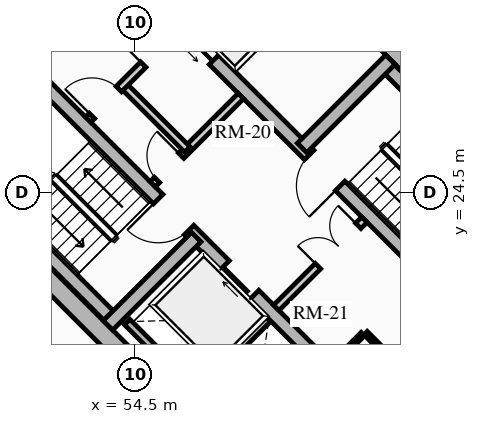
"""IFC4 building model, lengths in metres.
Left out: names, types, materials, properties, quantities, classifications, styles, units other than length and angle.
Written with IfcOpenShell. Run it as: python <this file> out.ifc"""

import sys

from ifc_helpers import new_model, si_unit, direction, frame, frame_2d, origin, place, context, subcontext, project, spatial, rectangle, extrude, source, transform, mapped, element, fill, save


model = new_model("IFC4")
c1 = context("Model", 3, precision=1e-05, world=origin(), true_north=direction((0.0, 1.0)))
c2 = subcontext(c1, "Body", "Model", "MODEL_VIEW")
j1 = project(units=[si_unit("LENGTHUNIT", "METRE"), si_unit("PLANEANGLEUNIT", "RADIAN")], contexts=[c1])
p1 = place(None, origin())
s1 = spatial("IfcSite", under=j1, at=p1, CompositionType="ELEMENT")
p2 = place(p1, origin())
s2 = spatial("IfcBuilding", under=s1, at=p2, CompositionType="ELEMENT")
p3 = place(p2, frame((0.0, 0.0, 59.83)))
s3 = spatial("IfcBuildingStorey", under=s2, at=p3, CompositionType="ELEMENT", Elevation=59.83)
for number, where, z_axis, x_axis in (
    (1, (58.773, 15.661, 0.0), (0.0, 0.0, 1.0), (-0.707, 0.707, 0.0)),
    (2, (66.339, 23.227, 0.0), (0.0, 0.0, 1.0), (-0.707, 0.707, 0.0)),
):
    element("IfcWall", number, at=place(p3, frame(where, z_axis=z_axis, x_axis=x_axis)), inside=s3, PredefinedType="SHEAR", context=c2, shape_type="SweptSolid", body=[
        extrude(rectangle(XDim=14.3, YDim=0.5, at=frame_2d((7.15, 0.0))), origin(), (0.0, 0.0, 1.0), 2.91),
    ])
p4 = place(p3, frame((58.596, 15.838, 0.0), z_axis=(0.0, 0.0, 1.0), x_axis=(0.707106781187, 0.707106781187, 0.0)))
e3 = element("IfcWall", 3, at=p4, inside=s3, PredefinedType="SHEAR", context=c2, shape_type="SweptSolid", body=[
    extrude(rectangle(XDim=10.7, YDim=0.5, at=frame_2d((5.35, 0.0))), origin(), (0.0, 0.0, 1.0), 2.91),
])
m1 = source(origin(), c2, "Body", "SweptSolid", [
    extrude(rectangle(XDim=1.5, YDim=2.02, at=frame_2d((0.75, 1.01))), frame((0.0, 0.26, 0.0), z_axis=(0.0, -1.0, 0.0), x_axis=(1.0, 0.0, 0.0)), (0.0, 0.0, 1.0), 0.52),
])
p5 = place(p4, frame((5.45, 0.0, 0.0)))
e4 = element("IfcOpeningElement", 4, at=p5, cuts=e3, PredefinedType="OPENING", context=c2, shape_type="MappedRepresentation", body=[
    mapped(m1, transform((0.0, 0.0, 0.0), x_axis=(1.0, 0.0, 0.0), y_axis=(0.0, 1.0, 0.0), z_axis=(0.0, 0.0, 1.0), scale=1.0)),
])
p6 = place(p3, frame((48.838, 25.596, 0.0), z_axis=(0.0, 0.0, 1.0), x_axis=(0.707106781187, 0.707106781187, 0.0)))
e5 = element("IfcWall", 5, at=p6, inside=s3, PredefinedType="SHEAR", context=c2, shape_type="SweptSolid", body=[
    extrude(rectangle(XDim=10.7, YDim=0.5, at=frame_2d((5.35, 0.0))), origin(), (0.0, 0.0, 1.0), 2.91),
])
p7 = place(p6, frame((4.6, 0.0, 0.0)))
e6 = element("IfcOpeningElement", 6, at=p7, cuts=e5, PredefinedType="OPENING", context=c2, shape_type="MappedRepresentation", body=[
    mapped(m1, transform((0.0, 0.0, 0.0), x_axis=(1.0, 0.0, 0.0), y_axis=(0.0, 1.0, 0.0), z_axis=(0.0, 0.0, 1.0), scale=1.0)),
])
p8 = place(p3, frame((61.096, 18.338, 0.0), z_axis=(0.0, 0.0, 1.0), x_axis=(-0.707106781187, 0.707106781187, 0.0)))
e7 = element("IfcWall", 7, at=p8, inside=s3, PredefinedType="SHEAR", context=c2, shape_type="SweptSolid", body=[
    extrude(rectangle(XDim=13.8, YDim=0.35, at=frame_2d((6.9, 0.0))), origin(), (0.0, 0.0, 1.0), 2.91),
])
m2 = source(origin(), c2, "Body", "SweptSolid", [
    extrude(rectangle(XDim=1.1, YDim=2.015, at=frame_2d((0.55, 1.007))), frame((0.0, 0.185, 0.0), z_axis=(0.0, -1.0, 0.0), x_axis=(1.0, 0.0, 0.0)), (0.0, 0.0, 1.0), 0.37),
])
p9 = place(p8, frame((4.9, 0.0, 0.0)))
e8 = element("IfcOpeningElement", 8, at=p9, cuts=e7, PredefinedType="OPENING", context=c2, shape_type="MappedRepresentation", body=[
    mapped(m2, transform((0.0, 0.0, 0.0), x_axis=(1.0, 0.0, 0.0), y_axis=(0.0, 1.0, 0.0), z_axis=(0.0, 0.0, 1.0), scale=1.0)),
])
m3 = source(origin(), c2, "Body", "SweptSolid", [
    extrude(rectangle(XDim=1.15, YDim=2.02, at=frame_2d((0.575, 1.01))), frame((0.0, 0.185, 0.0), z_axis=(0.0, -1.0, 0.0), x_axis=(1.0, 0.0, 0.0)), (0.0, 0.0, 1.0), 0.37),
])
p10 = place(p8, frame((7.32, 0.0, 0.0)))
e9 = element("IfcOpeningElement", 9, at=p10, cuts=e7, PredefinedType="OPENING", context=c2, shape_type="MappedRepresentation", body=[
    mapped(m3, transform((0.0, 0.0, 0.0), x_axis=(1.0, 0.0, 0.0), y_axis=(0.0, 1.0, 0.0), z_axis=(0.0, 0.0, 1.0), scale=1.0)),
])
p11 = place(p3, frame((63.662, 20.904, 0.0), z_axis=(0.0, 0.0, 1.0), x_axis=(-0.707106781187, 0.707106781187, 0.0)))
e10 = element("IfcWall", 10, at=p11, inside=s3, PredefinedType="SHEAR", context=c2, shape_type="SweptSolid", body=[
    extrude(rectangle(XDim=13.8, YDim=0.35, at=frame_2d((6.9, 0.0))), origin(), (0.0, 0.0, 1.0), 2.91),
])
p12 = place(p11, frame((10.025, 0.0, 0.0)))
e11 = element("IfcOpeningElement", 11, at=p12, cuts=e10, PredefinedType="OPENING", context=c2, shape_type="MappedRepresentation", body=[
    mapped(m2, transform((0.0, 0.0, 0.0), x_axis=(1.0, 0.0, 0.0), y_axis=(0.0, 1.0, 0.0), z_axis=(0.0, 0.0, 1.0), scale=1.0)),
])
p13 = place(p11, frame((12.025, 0.0, 0.0)))
e12 = element("IfcOpeningElement", 12, at=p13, cuts=e10, PredefinedType="OPENING", context=c2, shape_type="MappedRepresentation", body=[
    mapped(m2, transform((0.0, 0.0, 0.0), x_axis=(1.0, 0.0, 0.0), y_axis=(0.0, 1.0, 0.0), z_axis=(0.0, 0.0, 1.0), scale=1.0)),
])
p14 = place(p11, frame((5.33, 0.0, 0.0)))
e13 = element("IfcOpeningElement", 13, at=p14, cuts=e10, PredefinedType="OPENING", context=c2, shape_type="MappedRepresentation", body=[
    mapped(m3, transform((0.0, 0.0, 0.0), x_axis=(1.0, 0.0, 0.0), y_axis=(0.0, 1.0, 0.0), z_axis=(0.0, 0.0, 1.0), scale=1.0)),
])
p15 = place(p3, frame((53.922, 21.141, 0.0), z_axis=(0.0, 0.0, 1.0), x_axis=(-0.707106781187, 0.707106781187, 0.0)))
e14 = element("IfcWall", 14, at=p15, inside=s3, PredefinedType="SHEAR", context=c2, shape_type="SweptSolid", body=[
    extrude(rectangle(XDim=6.745, YDim=0.35, at=frame_2d((3.373, 0.0))), origin(), (0.0, 0.0, 1.0), 2.91),
])
p16 = place(p3, frame((53.784, 21.003, 0.0), z_axis=(0.0, 0.0, 1.0), x_axis=(0.707106781187, 0.707106781187, 0.0)))
e15 = element("IfcWall", 15, at=p16, inside=s3, PredefinedType="SHEAR", context=c2, shape_type="SweptSolid", body=[
    extrude(rectangle(XDim=3.285, YDim=0.35, at=frame_2d((1.643, 0.0))), origin(), (0.0, 0.0, 1.0), 2.91),
])
p17 = place(p3, frame((65.847, 23.089, 0.0), z_axis=(0.0, 0.0, 1.0), x_axis=(-0.707106781187, 0.707106781187, 0.0)))
e16 = element("IfcWall", 16, at=p17, inside=s3, PredefinedType="SHEAR", context=c2, shape_type="SweptSolid", body=[
    extrude(rectangle(XDim=6.745, YDim=0.35, at=frame_2d((3.373, 0.0))), origin(), (0.0, 0.0, 1.0), 2.91),
])
p18 = place(p3, frame((58.893, 25.674, 0.0), z_axis=(0.0, 0.0, 1.0), x_axis=(0.707106781187, 0.707106781187, 0.0)))
e17 = element("IfcWall", 17, at=p18, inside=s3, PredefinedType="SHEAR", context=c2, shape_type="SweptSolid", body=[
    extrude(rectangle(XDim=3.285, YDim=0.35, at=frame_2d((1.643, 0.0))), origin(), (0.0, 0.0, 1.0), 2.91),
])
p19 = place(p3, frame((55.888, 19.069, 0.0), z_axis=(0.0, 0.0, 1.0), x_axis=(0.707106781187, 0.707106781187, 0.0)))
e18 = element("IfcWall", 18, at=p19, inside=s3, PredefinedType="SHEAR", context=c2, shape_type="SweptSolid", body=[
    extrude(rectangle(XDim=2.97, YDim=0.2, at=frame_2d((1.485, 0.0))), origin(), (0.0, 0.0, 1.0), 2.91),
])
p20 = place(p3, frame((56.015, 19.366, 0.0), z_axis=(0.0, 0.0, 1.0), x_axis=(-0.707106781187, 0.707106781187, 0.0)))
e19 = element("IfcWall", 19, at=p20, inside=s3, PredefinedType="SHEAR", context=c2, shape_type="SweptSolid", body=[
    extrude(rectangle(XDim=2.44, YDim=0.2, at=frame_2d((1.22, 0.0))), origin(), (0.0, 0.0, 1.0), 2.91),
])
p21 = place(p3, frame((57.062, 27.781, 0.0), z_axis=(0.0, 0.0, 1.0), x_axis=(0.707106781187, 0.707106781187, 0.0)))
e20 = element("IfcWall", 20, at=p21, inside=s3, PredefinedType="SHEAR", context=c2, shape_type="SweptSolid", body=[
    extrude(rectangle(XDim=2.97, YDim=0.2, at=frame_2d((1.485, 0.0))), origin(), (0.0, 0.0, 1.0), 2.91),
])
p22 = place(p3, frame((58.214, 21.467, 0.0), z_axis=(0.0, 0.0, 1.0), x_axis=(0.707106781187, 0.707106781187, 0.0)))
e21 = element("IfcWall", 21, at=p22, inside=s3, PredefinedType="PARTITIONING", context=c2, shape_type="SweptSolid", body=[
    extrude(rectangle(XDim=3.28, YDim=0.2, at=frame_2d((1.64, 0.0))), origin(), (0.0, 0.0, 1.0), 2.635),
])
m4 = source(origin(), c2, "Body", "SweptSolid", [
    extrude(rectangle(XDim=1.5, YDim=2.02, at=frame_2d((0.75, 1.01))), frame((0.0, 0.11, 0.0), z_axis=(0.0, -1.0, 0.0), x_axis=(1.0, 0.0, 0.0)), (0.0, 0.0, 1.0), 0.22),
])
p23 = place(p22, frame((1.55, 0.0, 0.0)))
e22 = element("IfcOpeningElement", 22, at=p23, cuts=e21, PredefinedType="OPENING", context=c2, shape_type="MappedRepresentation", body=[
    mapped(m4, transform((0.0, 0.0, 0.0), x_axis=(1.0, 0.0, 0.0), y_axis=(0.0, 1.0, 0.0), z_axis=(0.0, 0.0, 1.0), scale=1.0)),
])
p24 = place(p3, frame((54.961, 24.719, 0.0), z_axis=(0.0, 0.0, 1.0), x_axis=(0.707106781187, 0.707106781187, 0.0)))
e23 = element("IfcWall", 23, at=p24, inside=s3, PredefinedType="PARTITIONING", context=c2, shape_type="SweptSolid", body=[
    extrude(rectangle(XDim=3.28, YDim=0.2, at=frame_2d((1.64, 0.0))), origin(), (0.0, 0.0, 1.0), 2.635),
])
m5 = source(origin(), c2, "Body", "SweptSolid", [
    extrude(rectangle(XDim=0.9, YDim=2.005, at=frame_2d((0.45, 1.002))), frame((0.0, 0.11, 0.0), z_axis=(0.0, -1.0, 0.0), x_axis=(1.0, 0.0, 0.0)), (0.0, 0.0, 1.0), 0.22),
])
p25 = place(p24, frame((0.16, 0.0, 0.0)))
e24 = element("IfcOpeningElement", 24, at=p25, cuts=e23, PredefinedType="OPENING", context=c2, shape_type="MappedRepresentation", body=[
    mapped(m5, transform((0.0, 0.0, 0.0), x_axis=(1.0, 0.0, 0.0), y_axis=(0.0, 1.0, 0.0), z_axis=(0.0, 0.0, 1.0), scale=1.0)),
])
p26 = place(p3, frame((55.874, 25.631, 0.0), z_axis=(0.0, 0.0, 1.0), x_axis=(-0.707157639372, 0.707055919343, 0.0)))
e25 = element("IfcWall", 25, at=p26, inside=s3, PredefinedType="PARTITIONING", context=c2, shape_type="SweptSolid", body=[
    extrude(rectangle(XDim=2.4, YDim=0.2, at=frame_2d((1.2, 0.0))), origin(), (0.0, 0.0, 1.0), 2.635),
])
p27 = place(p3, frame((53.264, 26.416, 0.0), z_axis=(0.0, 0.0, 1.0), x_axis=(0.707106781187, 0.707106781187, 0.0)))
e26 = element("IfcWall", 26, at=p27, inside=s3, PredefinedType="PARTITIONING", context=c2, shape_type="SweptSolid", body=[
    extrude(rectangle(XDim=3.28, YDim=0.2, at=frame_2d((1.64, 0.0))), origin(), (0.0, 0.0, 1.0), 2.635),
])
m6 = source(origin(), c2, "Body", "SweptSolid", [
    extrude(rectangle(XDim=1.0, YDim=2.015, at=frame_2d((0.5, 1.007))), frame((0.0, 0.11, 0.0), z_axis=(0.0, -1.0, 0.0), x_axis=(1.0, 0.0, 0.0)), (0.0, 0.0, 1.0), 0.22),
])
p28 = place(p27, frame((0.14, 0.0, 0.0)))
e27 = element("IfcOpeningElement", 27, at=p28, cuts=e26, PredefinedType="OPENING", context=c2, shape_type="MappedRepresentation", body=[
    mapped(m6, transform((0.0, 0.0, 0.0), x_axis=(1.0, 0.0, 0.0), y_axis=(0.0, 1.0, 0.0), z_axis=(0.0, 0.0, 1.0), scale=1.0)),
])
p29 = place(p27, frame((2.05, 0.0, 0.0)))
e28 = element("IfcOpeningElement", 28, at=p29, cuts=e26, PredefinedType="OPENING", context=c2, shape_type="MappedRepresentation", body=[
    mapped(m5, transform((0.0, 0.0, 0.0), x_axis=(1.0, 0.0, 0.0), y_axis=(0.0, 1.0, 0.0), z_axis=(0.0, 0.0, 1.0), scale=1.0)),
])
p30 = place(p3, frame((61.835, 19.529, 0.0), z_axis=(0.0, 0.0, 1.0), x_axis=(-0.707174592913, 0.707038962956, 0.0)))
e29 = element("IfcWall", 29, at=p30, inside=s3, PredefinedType="PARTITIONING", context=c2, shape_type="SweptSolid", body=[
    extrude(rectangle(XDim=1.8, YDim=0.125, at=frame_2d((0.9, 0.0))), origin(), (0.0, 0.0, 1.0), 2.635),
])
m7 = source(origin(), c2, "Body", "SweptSolid", [
    extrude(rectangle(XDim=0.9, YDim=2.005, at=frame_2d((0.45, 1.002))), frame((0.0, 0.073, 0.0), z_axis=(0.0, -1.0, 0.0), x_axis=(1.0, 0.0, 0.0)), (0.0, 0.0, 1.0), 0.145),
])
p31 = place(p30, frame((0.42, 0.0, 0.0)))
e30 = element("IfcOpeningElement", 30, at=p31, cuts=e29, PredefinedType="OPENING", context=c2, shape_type="MappedRepresentation", body=[
    mapped(m7, transform((0.0, 0.0, 0.0), x_axis=(1.0, 0.0, 0.0), y_axis=(0.0, 1.0, 0.0), z_axis=(0.0, 0.0, 1.0), scale=1.0)),
])
p32 = place(p3, frame((59.713, 19.996, 0.0), z_axis=(0.0, 0.0, 1.0), x_axis=(0.707217726, 0.706995818963, 0.0)))
e31 = element("IfcWall", 31, at=p32, inside=s3, PredefinedType="PARTITIONING", context=c2, shape_type="SweptSolid", body=[
    extrude(rectangle(XDim=1.1, YDim=0.125, at=frame_2d((0.55, 0.0))), origin(), (0.0, 0.0, 1.0), 2.635),
])
m8 = source(origin(), c2, "Body", "SweptSolid", [
    extrude(rectangle(XDim=1.1, YDim=2.015, at=frame_2d((0.55, 1.007))), frame((0.0, 0.025, 0.0), z_axis=(0.0, -1.0, 0.0), x_axis=(1.0, 0.0, 0.0)), (0.0, 0.0, 1.0), 0.05),
])
p33 = place(p9, origin())
e32 = element("IfcDoor", 32, at=p33, inside=s3, OperationType="SLIDING_TO_RIGHT", PredefinedType="DOOR", context=c2, shape_type="MappedRepresentation", body=[
    mapped(m8, transform((0.0, 0.0, 0.0), x_axis=(1.0, 0.0, 0.0), y_axis=(0.0, 1.0, 0.0), z_axis=(0.0, 0.0, 1.0), scale=1.0)),
])
fill(e8, e32)
p34 = place(p12, origin())
e33 = element("IfcDoor", 33, at=p34, inside=s3, OperationType="SLIDING_TO_LEFT", PredefinedType="DOOR", context=c2, shape_type="MappedRepresentation", body=[
    mapped(m8, transform((0.0, 0.0, 0.0), x_axis=(1.0, 0.0, 0.0), y_axis=(0.0, 1.0, 0.0), z_axis=(0.0, 0.0, 1.0), scale=1.0)),
])
fill(e11, e33)
m9 = source(origin(), c2, "Body", "SweptSolid", [
    extrude(rectangle(XDim=1.15, YDim=2.02, at=frame_2d((0.575, 1.01))), frame((0.0, 0.025, 0.0), z_axis=(0.0, -1.0, 0.0), x_axis=(1.0, 0.0, 0.0)), (0.0, 0.0, 1.0), 0.05),
])
p35 = place(p10, origin())
e34 = element("IfcDoor", 34, at=p35, inside=s3, OperationType="SINGLE_SWING_RIGHT", PredefinedType="DOOR", context=c2, shape_type="MappedRepresentation", body=[
    mapped(m9, transform((0.0, 0.0, 0.0), x_axis=(1.0, 0.0, 0.0), y_axis=(0.0, 1.0, 0.0), z_axis=(0.0, 0.0, 1.0), scale=1.0)),
])
fill(e9, e34)
p36 = place(p14, origin())
e35 = element("IfcDoor", 35, at=p36, inside=s3, OperationType="SINGLE_SWING_LEFT", PredefinedType="DOOR", context=c2, shape_type="MappedRepresentation", body=[
    mapped(m9, transform((0.0, 0.0, 0.0), x_axis=(1.0, 0.0, 0.0), y_axis=(0.0, 1.0, 0.0), z_axis=(0.0, 0.0, 1.0), scale=1.0)),
])
fill(e13, e35)
m10 = source(origin(), c2, "Body", "SweptSolid", [
    extrude(rectangle(XDim=1.5, YDim=2.02, at=frame_2d((0.75, 1.01))), frame((0.0, 0.025, 0.0), z_axis=(0.0, -1.0, 0.0), x_axis=(1.0, 0.0, 0.0)), (0.0, 0.0, 1.0), 0.05),
])
p37 = place(p23, origin())
e36 = element("IfcDoor", 36, at=p37, inside=s3, OperationType="DOUBLE_DOOR_SINGLE_SWING", PredefinedType="DOOR", context=c2, shape_type="MappedRepresentation", body=[
    mapped(m10, transform((0.0, 0.0, 0.0), x_axis=(1.0, 0.0, 0.0), y_axis=(0.0, 1.0, 0.0), z_axis=(0.0, 0.0, 1.0), scale=1.0)),
])
fill(e22, e36)
m11 = source(origin(), c2, "Body", "SweptSolid", [
    extrude(rectangle(XDim=0.9, YDim=2.005, at=frame_2d((0.45, 1.002))), frame((0.0, 0.025, 0.0), z_axis=(0.0, -1.0, 0.0), x_axis=(1.0, 0.0, 0.0)), (0.0, 0.0, 1.0), 0.05),
])
p38 = place(p25, origin())
e37 = element("IfcDoor", 37, at=p38, inside=s3, OperationType="SINGLE_SWING_RIGHT", PredefinedType="DOOR", context=c2, shape_type="MappedRepresentation", body=[
    mapped(m11, transform((0.0, 0.0, 0.0), x_axis=(1.0, 0.0, 0.0), y_axis=(0.0, 1.0, 0.0), z_axis=(0.0, 0.0, 1.0), scale=1.0)),
])
fill(e24, e37)
m12 = source(origin(), c2, "Body", "SweptSolid", [
    extrude(rectangle(XDim=1.0, YDim=2.015, at=frame_2d((0.5, 1.007))), frame((0.0, 0.025, 0.0), z_axis=(0.0, -1.0, 0.0), x_axis=(1.0, 0.0, 0.0)), (0.0, 0.0, 1.0), 0.05),
])
p39 = place(p28, origin())
e38 = element("IfcDoor", 38, at=p39, inside=s3, OperationType="SINGLE_SWING_LEFT", PredefinedType="DOOR", context=c2, shape_type="MappedRepresentation", body=[
    mapped(m12, transform((0.0, 0.0, 0.0), x_axis=(1.0, 0.0, 0.0), y_axis=(0.0, 1.0, 0.0), z_axis=(0.0, 0.0, 1.0), scale=1.0)),
])
fill(e27, e38)
p40 = place(p29, origin())
e39 = element("IfcDoor", 39, at=p40, inside=s3, OperationType="SINGLE_SWING_LEFT", PredefinedType="DOOR", context=c2, shape_type="MappedRepresentation", body=[
    mapped(m11, transform((0.0, 0.0, 0.0), x_axis=(1.0, 0.0, 0.0), y_axis=(0.0, 1.0, 0.0), z_axis=(0.0, 0.0, 1.0), scale=1.0)),
])
fill(e28, e39)
save(model, sys.argv[1])
